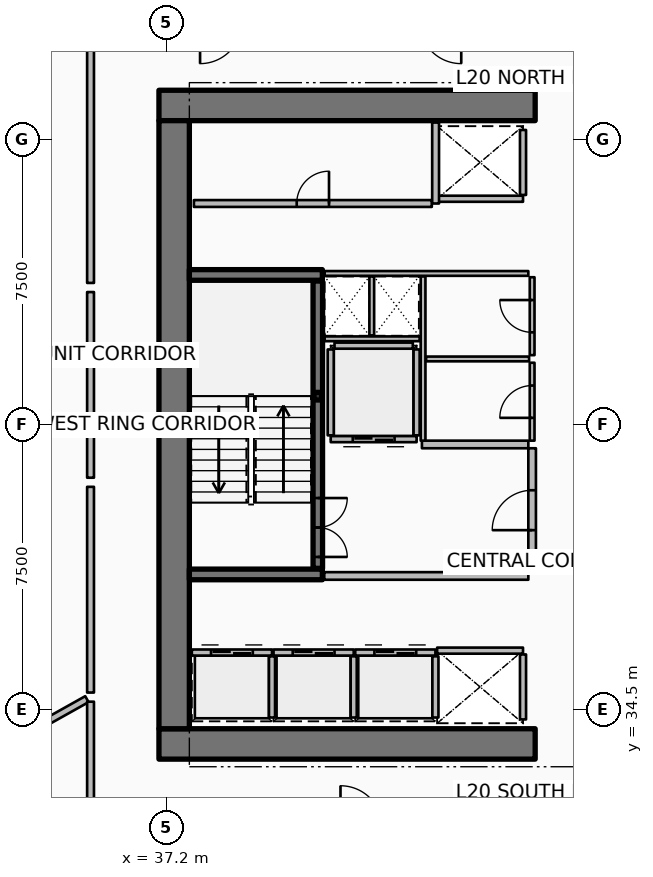
"""IFC4 building model, lengths in metres.
Left out: names, types, materials, properties, quantities, classifications, styles, units other than length and angle.
Written with IfcOpenShell. Run it as: python <this file> out.ifc"""

import sys

from ifc_helpers import new_model, si_unit, direction, frame, frame_2d, origin, origin_2d, place, context, subcontext, project, spatial, rectangle, hollow_rectangle, extrude, element, fill, save


model = new_model("IFC4")
c1 = context("Model", 3, precision=1e-05, world=origin(), true_north=direction((0.0, 1.0)))
c2 = subcontext(c1, "Body", "Model", "MODEL_VIEW")
j1 = project(units=[si_unit("LENGTHUNIT", "METRE"), si_unit("PLANEANGLEUNIT", "RADIAN")], contexts=[c1])
p1 = place(None, origin())
s1 = spatial("IfcSite", under=j1, at=p1, CompositionType="ELEMENT")
p2 = place(p1, origin())
s2 = spatial("IfcBuilding", under=s1, at=p2, CompositionType="ELEMENT")
p3 = place(p2, frame((0.0, 0.0, 82.65)))
s3 = spatial("IfcBuildingStorey", under=s2, at=p3, CompositionType="ELEMENT", Elevation=82.65)
for number, where, z_axis, x_axis in (
    (1, (37.0, 33.6, 0.0), (0.0, 0.0, 1.0), (1.0, 0.0, 0.0)),
    (2, (37.0, 50.4, 0.0), (0.0, 0.0, 1.0), (1.0, 0.0, 0.0)),
):
    element("IfcWall", number, at=place(p3, frame(where, z_axis=z_axis, x_axis=x_axis)), inside=s3, PredefinedType="SHEAR", context=c2, shape_type="SweptSolid", body=[
        extrude(rectangle(XDim=9.9, YDim=0.8, at=frame_2d((4.95, 0.0))), origin(), (0.0, 0.0, 1.0), 3.75),
    ])
p4 = place(p3, frame((37.4, 34.0, 0.0), z_axis=(0.0, 0.0, 1.0), x_axis=(0.0, 1.0, 0.0)))
e3 = element("IfcWall", 3, at=p4, inside=s3, PredefinedType="SHEAR", context=c2, shape_type="SweptSolid", body=[
    extrude(rectangle(XDim=16.0, YDim=0.8, at=frame_2d((8.0, 0.0))), origin(), (0.0, 0.0, 1.0), 3.75),
])
for number, where, z_axis, x_axis in (
    (4, (37.8, 38.06, 0.0), (0.0, 0.0, 1.0), (1.0, 0.0, 0.0)),
    (5, (37.8, 45.94, 0.0), (0.0, 0.0, 1.0), (1.0, 0.0, 0.0)),
):
    element("IfcWall", number, at=place(p3, frame(where, z_axis=z_axis, x_axis=x_axis)), inside=s3, PredefinedType="SHEAR", context=c2, shape_type="SweptSolid", body=[
        extrude(rectangle(XDim=3.5, YDim=0.28, at=frame_2d((1.75, 0.0))), origin(), (0.0, 0.0, 1.0), 3.75),
    ])
p5 = place(p3, frame((41.18, 42.75, 0.0), z_axis=(0.0, 0.0, 1.0), x_axis=(1.0, 0.0, 0.0)))
e6 = element("IfcColumn", 6, at=p5, inside=s3, PredefinedType="COLUMN", context=c2, shape_type="SweptSolid", body=[
    extrude(hollow_rectangle(XDim=0.2, YDim=0.2, WallThickness=0.01, InnerFilletRadius=0.01, OuterFilletRadius=0.02, at=origin_2d()), origin(), (0.0, 0.0, 1.0), 1.67),
])
p6 = place(p3, frame((41.18, 38.22, 0.0), z_axis=(0.0, 0.0, 1.0), x_axis=(0.0, 1.0, 0.0)))
e7 = element("IfcWall", 7, at=p6, inside=s3, PredefinedType="SOLIDWALL", context=c2, shape_type="SweptSolid", body=[
    extrude(rectangle(XDim=7.56, YDim=0.25, at=frame_2d((3.78, 0.0))), origin(), (0.0, 0.0, 1.0), 3.5),
])
p7 = place(p6, frame((0.3, 0.0, 0.0)))
e8 = element("IfcOpeningElement", 8, at=p7, cuts=e7, PredefinedType="OPENING", context=c2, shape_type="SweptSolid", body=[
    extrude(rectangle(XDim=1.55, YDim=2.15, at=frame_2d((0.775, 1.075))), frame((0.0, 0.135, 0.0), z_axis=(0.0, -1.0, 0.0), x_axis=(1.0, 0.0, 0.0)), (0.0, 0.0, 1.0), 0.27),
])
p8 = place(p3, frame((37.865, 36.005, 0.0), z_axis=(0.0, 0.0, 1.0), x_axis=(1.0, 0.0, 0.0)))
e9 = element("IfcWall", 9, at=p8, inside=s3, PredefinedType="PARTITIONING", context=c2, shape_type="SweptSolid", body=[
    extrude(rectangle(XDim=2.11, YDim=0.16, at=frame_2d((1.055, 0.0))), origin(), (0.0, 0.0, 1.0), 3.5),
])
p9 = place(p8, frame((0.505, 0.0, 0.0)))
e10 = element("IfcOpeningElement", 10, at=p9, cuts=e9, PredefinedType="OPENING", context=c2, shape_type="SweptSolid", body=[
    extrude(rectangle(XDim=1.1, YDim=2.1, at=frame_2d((0.55, 1.05))), frame((0.0, 0.09, 0.0), z_axis=(0.0, -1.0, 0.0), x_axis=(1.0, 0.0, 0.0)), (0.0, 0.0, 1.0), 0.18),
])
p10 = place(p3, frame((39.975, 34.295, 0.0), z_axis=(0.0, 0.0, 1.0), x_axis=(0.0, 1.0, 0.0)))
e11 = element("IfcWall", 11, at=p10, inside=s3, PredefinedType="PARTITIONING", context=c2, shape_type="SweptSolid", body=[
    extrude(rectangle(XDim=1.61, YDim=0.16, at=frame_2d((0.805, 0.0))), origin(), (0.0, 0.0, 1.0), 3.5),
])
p11 = place(p3, frame((40.015, 36.005, 0.0), z_axis=(0.0, 0.0, 1.0), x_axis=(1.0, 0.0, 0.0)))
e12 = element("IfcWall", 12, at=p11, inside=s3, PredefinedType="PARTITIONING", context=c2, shape_type="SweptSolid", body=[
    extrude(rectangle(XDim=2.11, YDim=0.16, at=frame_2d((1.055, 0.0))), origin(), (0.0, 0.0, 1.0), 3.5),
])
p12 = place(p11, frame((0.505, 0.0, 0.0)))
e13 = element("IfcOpeningElement", 13, at=p12, cuts=e12, PredefinedType="OPENING", context=c2, shape_type="SweptSolid", body=[
    extrude(rectangle(XDim=1.1, YDim=2.1, at=frame_2d((0.55, 1.05))), frame((0.0, 0.09, 0.0), z_axis=(0.0, -1.0, 0.0), x_axis=(1.0, 0.0, 0.0)), (0.0, 0.0, 1.0), 0.18),
])
p13 = place(p3, frame((42.125, 34.295, 0.0), z_axis=(0.0, 0.0, 1.0), x_axis=(0.0, 1.0, 0.0)))
e14 = element("IfcWall", 14, at=p13, inside=s3, PredefinedType="PARTITIONING", context=c2, shape_type="SweptSolid", body=[
    extrude(rectangle(XDim=1.61, YDim=0.16, at=frame_2d((0.805, 0.0))), origin(), (0.0, 0.0, 1.0), 3.5),
])
p14 = place(p3, frame((42.165, 36.005, 0.0), z_axis=(0.0, 0.0, 1.0), x_axis=(1.0, 0.0, 0.0)))
e15 = element("IfcWall", 15, at=p14, inside=s3, PredefinedType="PARTITIONING", context=c2, shape_type="SweptSolid", body=[
    extrude(rectangle(XDim=2.11, YDim=0.16, at=frame_2d((1.055, 0.0))), origin(), (0.0, 0.0, 1.0), 3.5),
])
p15 = place(p14, frame((0.505, 0.0, 0.0)))
e16 = element("IfcOpeningElement", 16, at=p15, cuts=e15, PredefinedType="OPENING", context=c2, shape_type="SweptSolid", body=[
    extrude(rectangle(XDim=1.1, YDim=2.1, at=frame_2d((0.55, 1.05))), frame((0.0, 0.09, 0.0), z_axis=(0.0, -1.0, 0.0), x_axis=(1.0, 0.0, 0.0)), (0.0, 0.0, 1.0), 0.18),
])
p16 = place(p3, frame((44.275, 34.295, 0.0), z_axis=(0.0, 0.0, 1.0), x_axis=(0.0, 1.0, 0.0)))
e17 = element("IfcWall", 17, at=p16, inside=s3, PredefinedType="PARTITIONING", context=c2, shape_type="SweptSolid", body=[
    extrude(rectangle(XDim=1.61, YDim=0.16, at=frame_2d((0.805, 0.0))), origin(), (0.0, 0.0, 1.0), 3.5),
])
p17 = place(p3, frame((46.58, 47.945, 0.0), z_axis=(0.0, 0.0, 1.0), x_axis=(-1.0, 0.0, 0.0)))
e18 = element("IfcWall", 18, at=p17, inside=s3, PredefinedType="PARTITIONING", context=c2, shape_type="SweptSolid", body=[
    extrude(rectangle(XDim=2.26, YDim=0.16, at=frame_2d((1.13, 0.0))), origin(), (0.0, 0.0, 1.0), 3.5),
])
p18 = place(p3, frame((46.58, 48.045, 0.0), z_axis=(0.0, 0.0, 1.0), x_axis=(0.0, 1.0, 0.0)))
e19 = element("IfcWall", 19, at=p18, inside=s3, PredefinedType="PARTITIONING", context=c2, shape_type="SweptSolid", body=[
    extrude(rectangle(XDim=1.71, YDim=0.16, at=frame_2d((0.855, 0.0))), origin(), (0.0, 0.0, 1.0), 3.5),
])
p19 = place(p3, frame((44.32, 36.055, 0.0), z_axis=(0.0, 0.0, 1.0), x_axis=(1.0, 0.0, 0.0)))
e20 = element("IfcWall", 20, at=p19, inside=s3, PredefinedType="PARTITIONING", context=c2, shape_type="SweptSolid", body=[
    extrude(rectangle(XDim=2.26, YDim=0.16, at=frame_2d((1.13, 0.0))), origin(), (0.0, 0.0, 1.0), 3.5),
])
p20 = place(p3, frame((46.58, 34.245, 0.0), z_axis=(0.0, 0.0, 1.0), x_axis=(0.0, 1.0, 0.0)))
e21 = element("IfcWall", 21, at=p20, inside=s3, PredefinedType="PARTITIONING", context=c2, shape_type="SweptSolid", body=[
    extrude(rectangle(XDim=1.71, YDim=0.16, at=frame_2d((0.855, 0.0))), origin(), (0.0, 0.0, 1.0), 3.5),
])
p21 = place(p3, frame((43.78, 41.62, 0.0), z_axis=(0.0, 0.0, 1.0), x_axis=(-1.0, 0.0, 0.0)))
e22 = element("IfcWall", 22, at=p21, inside=s3, PredefinedType="PARTITIONING", context=c2, shape_type="SweptSolid", body=[
    extrude(rectangle(XDim=2.26, YDim=0.16, at=frame_2d((1.13, 0.0))), origin(), (0.0, 0.0, 1.0), 3.5),
])
p22 = place(p21, frame((0.58, 0.0, 0.0)))
e23 = element("IfcOpeningElement", 23, at=p22, cuts=e22, PredefinedType="OPENING", context=c2, shape_type="SweptSolid", body=[
    extrude(rectangle(XDim=1.1, YDim=2.1, at=frame_2d((0.55, 1.05))), frame((0.0, 0.09, 0.0), z_axis=(0.0, -1.0, 0.0), x_axis=(1.0, 0.0, 0.0)), (0.0, 0.0, 1.0), 0.18),
])
for number, where, z_axis, x_axis in (
    (24, (43.78, 41.72, 0.0), (0.0, 0.0, 1.0), (0.0, 1.0, 0.0)),
    (25, (41.52, 41.72, 0.0), (0.0, 0.0, 1.0), (0.0, 1.0, 0.0)),
):
    element("IfcWall", number, at=place(p3, frame(where, z_axis=z_axis, x_axis=x_axis)), inside=s3, PredefinedType="PARTITIONING", context=c2, shape_type="SweptSolid", body=[
        extrude(rectangle(XDim=2.26, YDim=0.16, at=frame_2d((1.13, 0.0))), origin(), (0.0, 0.0, 1.0), 3.5),
    ])
p23 = place(p3, frame((41.62, 44.08, 0.0), z_axis=(0.0, 0.0, 1.0), x_axis=(1.0, 0.0, 0.0)))
e26 = element("IfcWall", 26, at=p23, inside=s3, PredefinedType="PARTITIONING", context=c2, shape_type="SweptSolid", body=[
    extrude(rectangle(XDim=2.06, YDim=0.16, at=frame_2d((1.03, 0.0))), origin(), (0.0, 0.0, 1.0), 3.5),
])
p24 = place(p3, frame((37.92, 47.82, 0.0), z_axis=(0.0, 0.0, 1.0), x_axis=(1.0, 0.0, 0.0)))
e27 = element("IfcWall", 27, at=p24, inside=s3, PredefinedType="PARTITIONING", context=c2, shape_type="SweptSolid", body=[
    extrude(rectangle(XDim=6.26, YDim=0.18, at=frame_2d((3.13, 0.0))), origin(), (0.0, 0.0, 1.0), 3.5),
])
p25 = place(p24, frame((2.705, 0.0, 0.0)))
e28 = element("IfcOpeningElement", 28, at=p25, cuts=e27, PredefinedType="OPENING", context=c2, shape_type="SweptSolid", body=[
    extrude(rectangle(XDim=0.85, YDim=2.06, at=frame_2d((0.425, 1.03))), frame((0.0, 0.1, 0.0), z_axis=(0.0, -1.0, 0.0), x_axis=(1.0, 0.0, 0.0)), (0.0, 0.0, 1.0), 0.2),
])
p26 = place(p3, frame((44.28, 47.82, 0.0), z_axis=(0.0, 0.0, 1.0), x_axis=(0.0, 1.0, 0.0)))
e29 = element("IfcWall", 29, at=p26, inside=s3, PredefinedType="PARTITIONING", context=c2, shape_type="SweptSolid", body=[
    extrude(rectangle(XDim=2.13, YDim=0.18, at=frame_2d((1.065, 0.0))), origin(), (0.0, 0.0, 1.0), 3.5),
])
p27 = place(p3, frame((41.35, 38.02, 0.0), z_axis=(0.0, 0.0, 1.0), x_axis=(1.0, 0.0, 0.0)))
e30 = element("IfcWall", 30, at=p27, inside=s3, PredefinedType="PARTITIONING", context=c2, shape_type="SweptSolid", body=[
    extrude(rectangle(XDim=5.37, YDim=0.2, at=frame_2d((2.685, 0.0))), origin(), (0.0, 0.0, 1.0), 3.5),
])
p28 = place(p3, frame((43.92, 41.48, 0.0), z_axis=(0.0, 0.0, 1.0), x_axis=(1.0, 0.0, 0.0)))
e31 = element("IfcWall", 31, at=p28, inside=s3, PredefinedType="PARTITIONING", context=c2, shape_type="SweptSolid", body=[
    extrude(rectangle(XDim=2.8, YDim=0.2, at=frame_2d((1.4, 0.0))), origin(), (0.0, 0.0, 1.0), 3.5),
])
p29 = place(p3, frame((46.82, 38.12, 0.0), z_axis=(0.0, 0.0, 1.0), x_axis=(0.0, 1.0, 0.0)))
e32 = element("IfcWall", 32, at=p29, inside=s3, PredefinedType="PARTITIONING", context=c2, shape_type="SweptSolid", body=[
    extrude(rectangle(XDim=3.26, YDim=0.2, at=frame_2d((1.63, 0.0))), origin(), (0.0, 0.0, 1.0), 3.5),
])
p30 = place(p29, frame((1.105, 0.0, 0.0)))
e33 = element("IfcOpeningElement", 33, at=p30, cuts=e32, PredefinedType="OPENING", context=c2, shape_type="SweptSolid", body=[
    extrude(rectangle(XDim=1.05, YDim=2.1, at=frame_2d((0.525, 1.05))), frame((0.0, 0.11, 0.0), z_axis=(0.0, -1.0, 0.0), x_axis=(1.0, 0.0, 0.0)), (0.0, 0.0, 1.0), 0.22),
])
p31 = place(p3, frame((41.36, 45.98, 0.0), z_axis=(0.0, 0.0, 1.0), x_axis=(1.0, 0.0, 0.0)))
e34 = element("IfcWall", 34, at=p31, inside=s3, PredefinedType="PARTITIONING", context=c2, shape_type="SweptSolid", body=[
    extrude(rectangle(XDim=5.36, YDim=0.125, at=frame_2d((2.68, 0.0))), origin(), (0.0, 0.0, 1.0), 2.94),
])
p32 = place(p3, frame((41.36, 44.26, 0.0), z_axis=(0.0, 0.0, 1.0), x_axis=(1.0, 0.0, 0.0)))
e35 = element("IfcWall", 35, at=p32, inside=s3, PredefinedType="PARTITIONING", context=c2, shape_type="SweptSolid", body=[
    extrude(rectangle(XDim=2.5, YDim=0.125, at=frame_2d((1.25, 0.0))), origin(), (0.0, 0.0, 1.0), 2.94),
])
p33 = place(p3, frame((42.6, 44.35, 0.0), z_axis=(0.0, 0.0, 1.0), x_axis=(0.0, 1.0, 0.0)))
e36 = element("IfcWall", 36, at=p33, inside=s3, PredefinedType="PARTITIONING", context=c2, shape_type="SweptSolid", body=[
    extrude(rectangle(XDim=1.55, YDim=0.125, at=frame_2d((0.775, 0.0))), origin(), (0.0, 0.0, 1.0), 2.94),
])
p34 = place(p3, frame((43.95, 41.58, 0.0), z_axis=(0.0, 0.0, 1.0), x_axis=(0.0, 1.0, 0.0)))
e37 = element("IfcWall", 37, at=p34, inside=s3, PredefinedType="PARTITIONING", context=c2, shape_type="SweptSolid", body=[
    extrude(rectangle(XDim=4.32, YDim=0.125, at=frame_2d((2.16, 0.0))), origin(), (0.0, 0.0, 1.0), 2.94),
])
p35 = place(p3, frame((44.03, 43.73, 0.0), z_axis=(0.0, 0.0, 1.0), x_axis=(1.0, 0.0, 0.0)))
e38 = element("IfcWall", 38, at=p35, inside=s3, PredefinedType="PARTITIONING", context=c2, shape_type="SweptSolid", body=[
    extrude(rectangle(XDim=2.71, YDim=0.125, at=frame_2d((1.355, 0.0))), origin(), (0.0, 0.0, 1.0), 2.94),
])
p36 = place(p3, frame((46.82, 41.58, 0.0), z_axis=(0.0, 0.0, 1.0), x_axis=(0.0, 1.0, 0.0)))
e39 = element("IfcWall", 39, at=p36, inside=s3, PredefinedType="PARTITIONING", context=c2, shape_type="SweptSolid", body=[
    extrude(rectangle(XDim=2.05, YDim=0.125, at=frame_2d((1.025, 0.0))), origin(), (0.0, 0.0, 1.0), 2.94),
])
p37 = place(p36, frame((0.6, 0.0, 0.0)))
e40 = element("IfcOpeningElement", 40, at=p37, cuts=e39, PredefinedType="OPENING", context=c2, shape_type="SweptSolid", body=[
    extrude(rectangle(XDim=0.85, YDim=2.06, at=frame_2d((0.425, 1.03))), frame((0.0, 0.073, 0.0), z_axis=(0.0, -1.0, 0.0), x_axis=(1.0, 0.0, 0.0)), (0.0, 0.0, 1.0), 0.145),
])
p38 = place(p3, frame((46.82, 43.83, 0.0), z_axis=(0.0, 0.0, 1.0), x_axis=(0.0, 1.0, 0.0)))
e41 = element("IfcWall", 41, at=p38, inside=s3, PredefinedType="PARTITIONING", context=c2, shape_type="SweptSolid", body=[
    extrude(rectangle(XDim=2.05, YDim=0.125, at=frame_2d((1.025, 0.0))), origin(), (0.0, 0.0, 1.0), 2.94),
])
p39 = place(p38, frame((0.6, 0.0, 0.0)))
e42 = element("IfcOpeningElement", 42, at=p39, cuts=e41, PredefinedType="OPENING", context=c2, shape_type="SweptSolid", body=[
    extrude(rectangle(XDim=0.85, YDim=2.06, at=frame_2d((0.425, 1.03))), frame((0.0, 0.073, 0.0), z_axis=(0.0, -1.0, 0.0), x_axis=(1.0, 0.0, 0.0)), (0.0, 0.0, 1.0), 0.145),
])
p40 = place(p3, frame((35.104, 34.778, 0.0), z_axis=(0.0, 0.0, 1.0), x_axis=(-0.872490437896, -0.488631185845, 0.0)))
e43 = element("IfcWall", 43, at=p40, inside=s3, PredefinedType="PARTITIONING", context=c2, shape_type="SweptSolid", body=[
    extrude(rectangle(XDim=14.699, YDim=0.18, at=frame_2d((7.35, 0.0))), origin(), (0.0, 0.0, 1.0), 2.94),
])
p41 = place(p3, frame((35.2, 51.971, 0.0), z_axis=(0.0, 0.0, 1.0), x_axis=(0.0, -1.0, 0.0)))
e44 = element("IfcWall", 44, at=p41, inside=s3, PredefinedType="PARTITIONING", context=c2, shape_type="SweptSolid", body=[
    extrude(rectangle(XDim=6.241, YDim=0.18, at=frame_2d((3.12, 0.0))), origin(), (0.0, 0.0, 1.0), 2.94),
])
p42 = place(p3, frame((35.2, 45.49, 0.0), z_axis=(0.0, 0.0, 1.0), x_axis=(0.0, -1.0, 0.0)))
e45 = element("IfcWall", 45, at=p42, inside=s3, PredefinedType="PARTITIONING", context=c2, shape_type="SweptSolid", body=[
    extrude(rectangle(XDim=4.885, YDim=0.18, at=frame_2d((2.442, 0.0))), origin(), (0.0, 0.0, 1.0), 2.94),
])
p43 = place(p3, frame((35.2, 40.365, 0.0), z_axis=(0.0, 0.0, 1.0), x_axis=(0.0, -1.0, 0.0)))
e46 = element("IfcWall", 46, at=p43, inside=s3, PredefinedType="PARTITIONING", context=c2, shape_type="SweptSolid", body=[
    extrude(rectangle(XDim=5.413, YDim=0.18, at=frame_2d((2.707, 0.0))), origin(), (0.0, 0.0, 1.0), 2.94),
])
p44 = place(p3, frame((35.2, 34.712, 0.0), z_axis=(0.0, 0.0, 1.0), x_axis=(0.0, -1.0, 0.0)))
e47 = element("IfcWall", 47, at=p44, inside=s3, PredefinedType="PARTITIONING", context=c2, shape_type="SweptSolid", body=[
    extrude(rectangle(XDim=3.192, YDim=0.18, at=frame_2d((1.596, 0.0))), origin(), (0.0, 0.0, 1.0), 2.94),
])
p45 = place(p7, origin())
e48 = element("IfcDoor", 48, at=p45, inside=s3, OperationType="DOUBLE_DOOR_SINGLE_SWING", PredefinedType="DOOR", context=c2, shape_type="SweptSolid", body=[
    extrude(rectangle(XDim=1.55, YDim=2.15, at=frame_2d((0.775, 1.075))), frame((0.0, 0.025, 0.0), z_axis=(0.0, -1.0, 0.0), x_axis=(1.0, 0.0, 0.0)), (0.0, 0.0, 1.0), 0.05),
])
fill(e8, e48)
p46 = place(p9, origin())
e49 = element("IfcDoor", 49, at=p46, inside=s3, OperationType="DOUBLE_DOOR_SLIDING", PredefinedType="DOOR", context=c2, shape_type="SweptSolid", body=[
    extrude(rectangle(XDim=1.1, YDim=2.1, at=frame_2d((0.55, 1.05))), frame((0.0, 0.025, 0.0), z_axis=(0.0, -1.0, 0.0), x_axis=(1.0, 0.0, 0.0)), (0.0, 0.0, 1.0), 0.05),
])
fill(e10, e49)
p47 = place(p12, origin())
e50 = element("IfcDoor", 50, at=p47, inside=s3, OperationType="DOUBLE_DOOR_SLIDING", PredefinedType="DOOR", context=c2, shape_type="SweptSolid", body=[
    extrude(rectangle(XDim=1.1, YDim=2.1, at=frame_2d((0.55, 1.05))), frame((0.0, 0.025, 0.0), z_axis=(0.0, -1.0, 0.0), x_axis=(1.0, 0.0, 0.0)), (0.0, 0.0, 1.0), 0.05),
])
fill(e13, e50)
p48 = place(p15, origin())
e51 = element("IfcDoor", 51, at=p48, inside=s3, OperationType="DOUBLE_DOOR_SLIDING", PredefinedType="DOOR", context=c2, shape_type="SweptSolid", body=[
    extrude(rectangle(XDim=1.1, YDim=2.1, at=frame_2d((0.55, 1.05))), frame((0.0, 0.025, 0.0), z_axis=(0.0, -1.0, 0.0), x_axis=(1.0, 0.0, 0.0)), (0.0, 0.0, 1.0), 0.05),
])
fill(e16, e51)
p49 = place(p22, origin())
e52 = element("IfcDoor", 52, at=p49, inside=s3, OperationType="DOUBLE_DOOR_SLIDING", PredefinedType="DOOR", context=c2, shape_type="SweptSolid", body=[
    extrude(rectangle(XDim=1.1, YDim=2.1, at=frame_2d((0.55, 1.05))), frame((0.0, 0.025, 0.0), z_axis=(0.0, -1.0, 0.0), x_axis=(1.0, 0.0, 0.0)), (0.0, 0.0, 1.0), 0.05),
])
fill(e23, e52)
p50 = place(p25, origin())
e53 = element("IfcDoor", 53, at=p50, inside=s3, OperationType="SINGLE_SWING_RIGHT", PredefinedType="DOOR", context=c2, shape_type="SweptSolid", body=[
    extrude(rectangle(XDim=0.85, YDim=2.06, at=frame_2d((0.425, 1.03))), frame((0.0, 0.025, 0.0), z_axis=(0.0, -1.0, 0.0), x_axis=(1.0, 0.0, 0.0)), (0.0, 0.0, 1.0), 0.05),
])
fill(e28, e53)
p51 = place(p30, origin())
e54 = element("IfcDoor", 54, at=p51, inside=s3, OperationType="SINGLE_SWING_LEFT", PredefinedType="DOOR", context=c2, shape_type="SweptSolid", body=[
    extrude(rectangle(XDim=1.05, YDim=2.1, at=frame_2d((0.525, 1.05))), frame((0.0, 0.025, 0.0), z_axis=(0.0, -1.0, 0.0), x_axis=(1.0, 0.0, 0.0)), (0.0, 0.0, 1.0), 0.05),
])
fill(e33, e54)
p52 = place(p37, origin())
e55 = element("IfcDoor", 55, at=p52, inside=s3, OperationType="SINGLE_SWING_LEFT", PredefinedType="DOOR", context=c2, shape_type="SweptSolid", body=[
    extrude(rectangle(XDim=0.85, YDim=2.06, at=frame_2d((0.425, 1.03))), frame((0.0, 0.025, 0.0), z_axis=(0.0, -1.0, 0.0), x_axis=(1.0, 0.0, 0.0)), (0.0, 0.0, 1.0), 0.05),
])
fill(e40, e55)
p53 = place(p39, origin())
e56 = element("IfcDoor", 56, at=p53, inside=s3, OperationType="SINGLE_SWING_RIGHT", PredefinedType="DOOR", context=c2, shape_type="SweptSolid", body=[
    extrude(rectangle(XDim=0.85, YDim=2.06, at=frame_2d((0.425, 1.03))), frame((0.0, 0.025, 0.0), z_axis=(0.0, -1.0, 0.0), x_axis=(1.0, 0.0, 0.0)), (0.0, 0.0, 1.0), 0.05),
])
fill(e42, e56)
save(model, sys.argv[1])
